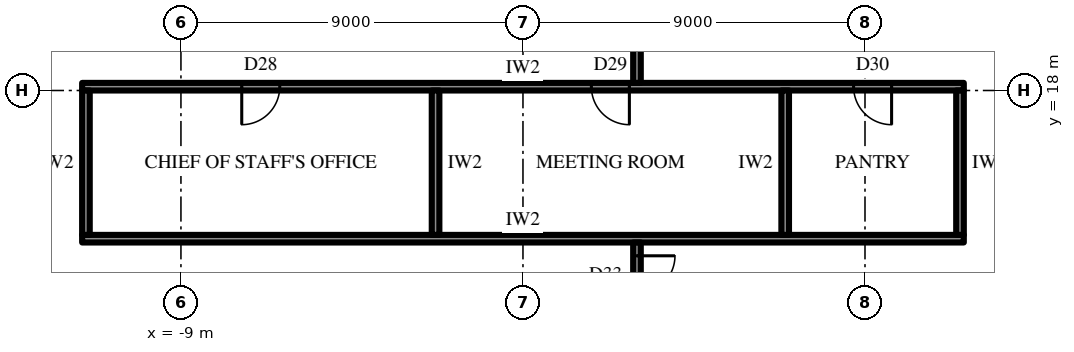
"""IFC4 building model, lengths in metres.
Left out: names, types, materials, properties, quantities, classifications, styles, units other than length and angle.
Written with IfcOpenShell. Run it as: python <this file> out.ifc"""

import sys

from ifc_helpers import new_model, si_unit, direction, frame, frame_2d, origin, place, context, subcontext, project, spatial, rectangle, extrude, element, fill, save


model = new_model("IFC4")
c1 = context("Model", 3, precision=1e-05, world=origin(), true_north=direction((0.0, 1.0)))
c2 = subcontext(c1, "Body", "Model", "MODEL_VIEW")
j1 = project(units=[si_unit("LENGTHUNIT", "METRE"), si_unit("PLANEANGLEUNIT", "RADIAN")], contexts=[c1])
p1 = place(None, origin())
s1 = spatial("IfcSite", under=j1, at=p1, CompositionType="ELEMENT")
p2 = place(p1, origin())
s2 = spatial("IfcBuilding", under=s1, at=p2, CompositionType="ELEMENT")
p3 = place(p2, frame((0.0, 0.0, 374.5)))
s3 = spatial("IfcBuildingStorey", under=s2, at=p3, CompositionType="ELEMENT", Elevation=374.5)
p4 = place(p3, frame((-11.6, 14.1, 0.0), z_axis=(0.0, 0.0, 1.0), x_axis=(1.0, 0.0, 0.0)))
e1 = element("IfcWall", 1, at=p4, inside=s3, PredefinedType="PARTITIONING", context=c2, shape_type="SweptSolid", body=[
    extrude(rectangle(XDim=23.2, YDim=0.2, at=frame_2d((11.6, 0.0))), origin(), (0.0, 0.0, 1.0), 4.0),
])
p5 = place(p3, frame((-11.6, 18.1, 0.0), z_axis=(0.0, 0.0, 1.0), x_axis=(1.0, 0.0, 0.0)))
e2 = element("IfcWall", 2, at=p5, inside=s3, PredefinedType="PARTITIONING", context=c2, shape_type="SweptSolid", body=[
    extrude(rectangle(XDim=23.2, YDim=0.2, at=frame_2d((11.6, 0.0))), origin(), (0.0, 0.0, 1.0), 4.0),
])
p6 = place(p5, frame((4.2, 0.0, 0.0)))
e3 = element("IfcOpeningElement", 3, at=p6, cuts=e2, PredefinedType="OPENING", context=c2, shape_type="SweptSolid", body=[
    extrude(rectangle(XDim=1.0, YDim=2.2, at=frame_2d((0.5, 1.1))), frame((0.0, 0.11, 0.0), z_axis=(0.0, -1.0, 0.0), x_axis=(1.0, 0.0, 0.0)), (0.0, 0.0, 1.0), 0.22),
])
p7 = place(p5, frame((13.4, 0.0, 0.0)))
e4 = element("IfcOpeningElement", 4, at=p7, cuts=e2, PredefinedType="OPENING", context=c2, shape_type="SweptSolid", body=[
    extrude(rectangle(XDim=1.0, YDim=2.2, at=frame_2d((0.5, 1.1))), frame((0.0, 0.11, 0.0), z_axis=(0.0, -1.0, 0.0), x_axis=(1.0, 0.0, 0.0)), (0.0, 0.0, 1.0), 0.22),
])
p8 = place(p5, frame((20.3, 0.0, 0.0)))
e5 = element("IfcOpeningElement", 5, at=p8, cuts=e2, PredefinedType="OPENING", context=c2, shape_type="SweptSolid", body=[
    extrude(rectangle(XDim=1.0, YDim=2.2, at=frame_2d((0.5, 1.1))), frame((0.0, 0.11, 0.0), z_axis=(0.0, -1.0, 0.0), x_axis=(1.0, 0.0, 0.0)), (0.0, 0.0, 1.0), 0.22),
])
for number, where, z_axis, x_axis in (
    (6, (-11.5, 14.2, 0.0), (0.0, 0.0, 1.0), (0.0, 1.0, 0.0)),
    (7, (-2.3, 14.2, 0.0), (0.0, 0.0, 1.0), (0.0, 1.0, 0.0)),
    (8, (6.9, 14.2, 0.0), (0.0, 0.0, 1.0), (0.0, 1.0, 0.0)),
    (9, (11.5, 14.2, 0.0), (0.0, 0.0, 1.0), (0.0, 1.0, 0.0)),
):
    element("IfcWall", number, at=place(p3, frame(where, z_axis=z_axis, x_axis=x_axis)), inside=s3, PredefinedType="PARTITIONING", context=c2, shape_type="SweptSolid", body=[
        extrude(rectangle(XDim=3.8, YDim=0.2, at=frame_2d((1.9, 0.0))), origin(), (0.0, 0.0, 1.0), 4.0),
    ])
p9 = place(p3, frame((3.0, 12.3, 0.0), z_axis=(0.0, 0.0, 1.0), x_axis=(0.0, 1.0, 0.0)))
e10 = element("IfcWall", 10, at=p9, inside=s3, PredefinedType="PARTITIONING", context=c2, shape_type="SweptSolid", body=[
    extrude(rectangle(XDim=1.7, YDim=0.2, at=frame_2d((0.85, 0.0))), origin(), (0.0, 0.0, 1.0), 4.0),
])
p10 = place(p9, frame((0.35, 0.0, 0.0)))
e11 = element("IfcOpeningElement", 11, at=p10, cuts=e10, PredefinedType="OPENING", context=c2, shape_type="SweptSolid", body=[
    extrude(rectangle(XDim=1.0, YDim=2.2, at=frame_2d((0.5, 1.1))), frame((0.0, 0.11, 0.0), z_axis=(0.0, -1.0, 0.0), x_axis=(1.0, 0.0, 0.0)), (0.0, 0.0, 1.0), 0.22),
])
p11 = place(p3, frame((3.0, 18.2, 0.0), z_axis=(0.0, 0.0, 1.0), x_axis=(0.0, 1.0, 0.0)))
e12 = element("IfcWall", 12, at=p11, inside=s3, PredefinedType="PARTITIONING", context=c2, shape_type="SweptSolid", body=[
    extrude(rectangle(XDim=3.45, YDim=0.2, at=frame_2d((1.725, 0.0))), origin(), (0.0, 0.0, 1.0), 4.0),
])
p12 = place(p6, frame((1.0, 0.0, 0.0), z_axis=(0.0, 0.0, 1.0), x_axis=(-1.0, 0.0, 0.0)))
e13 = element("IfcDoor", 13, at=p12, inside=s3, OperationType="SINGLE_SWING_LEFT", PredefinedType="DOOR", context=c2, shape_type="SweptSolid", body=[
    extrude(rectangle(XDim=1.0, YDim=2.2, at=frame_2d((0.5, 1.1))), frame((0.0, 0.025, 0.0), z_axis=(0.0, -1.0, 0.0), x_axis=(1.0, 0.0, 0.0)), (0.0, 0.0, 1.0), 0.05),
])
fill(e3, e13)
p13 = place(p7, frame((1.0, 0.0, 0.0), z_axis=(0.0, 0.0, 1.0), x_axis=(-1.0, 0.0, 0.0)))
e14 = element("IfcDoor", 14, at=p13, inside=s3, OperationType="SINGLE_SWING_RIGHT", PredefinedType="DOOR", context=c2, shape_type="SweptSolid", body=[
    extrude(rectangle(XDim=1.0, YDim=2.2, at=frame_2d((0.5, 1.1))), frame((0.0, 0.025, 0.0), z_axis=(0.0, -1.0, 0.0), x_axis=(1.0, 0.0, 0.0)), (0.0, 0.0, 1.0), 0.05),
])
fill(e4, e14)
p14 = place(p8, frame((1.0, 0.0, 0.0), z_axis=(0.0, 0.0, 1.0), x_axis=(-1.0, 0.0, 0.0)))
e15 = element("IfcDoor", 15, at=p14, inside=s3, OperationType="SINGLE_SWING_RIGHT", PredefinedType="DOOR", context=c2, shape_type="SweptSolid", body=[
    extrude(rectangle(XDim=1.0, YDim=2.2, at=frame_2d((0.5, 1.1))), frame((0.0, 0.025, 0.0), z_axis=(0.0, -1.0, 0.0), x_axis=(1.0, 0.0, 0.0)), (0.0, 0.0, 1.0), 0.05),
])
fill(e5, e15)
p15 = place(p10, frame((1.0, 0.0, 0.0), z_axis=(0.0, 0.0, 1.0), x_axis=(-1.0, 0.0, 0.0)))
e16 = element("IfcDoor", 16, at=p15, inside=s3, OperationType="SINGLE_SWING_RIGHT", PredefinedType="DOOR", context=c2, shape_type="SweptSolid", body=[
    extrude(rectangle(XDim=1.0, YDim=2.2, at=frame_2d((0.5, 1.1))), frame((0.0, 0.025, 0.0), z_axis=(0.0, -1.0, 0.0), x_axis=(1.0, 0.0, 0.0)), (0.0, 0.0, 1.0), 0.05),
])
fill(e11, e16)
save(model, sys.argv[1])
